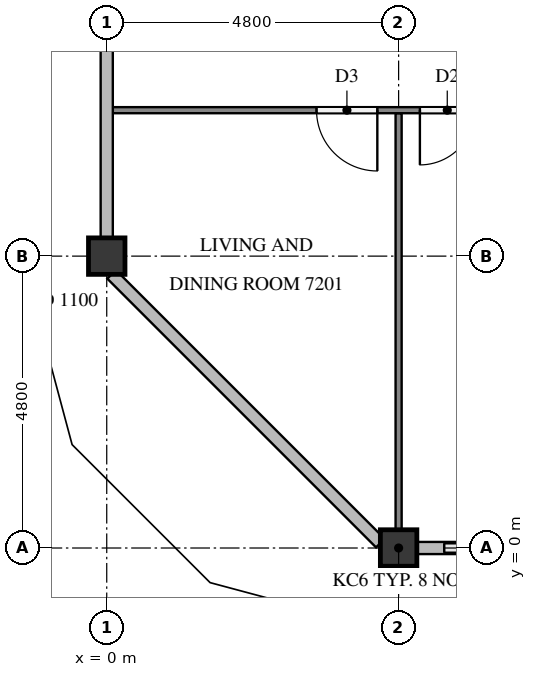
"""IFC4 building model, lengths in metres.
Left out: names, types, materials, properties, quantities, classifications, styles, units other than length and angle.
Written with IfcOpenShell. Run it as: python <this file> out.ifc"""

import sys

from ifc_helpers import new_model, si_unit, direction, frame, frame_2d, origin, origin_2d, place, context, subcontext, project, spatial, rectangle, extrude, element, fill, save


model = new_model("IFC4")
c1 = context("Model", 3, precision=1e-05, world=origin(), true_north=direction((0.0, 1.0)))
c2 = subcontext(c1, "Body", "Model", "MODEL_VIEW")
j1 = project(units=[si_unit("LENGTHUNIT", "METRE"), si_unit("PLANEANGLEUNIT", "RADIAN")], contexts=[c1])
p1 = place(None, origin())
s1 = spatial("IfcSite", under=j1, at=p1, CompositionType="ELEMENT")
p2 = place(p1, origin())
s2 = spatial("IfcBuilding", under=s1, at=p2, CompositionType="ELEMENT")
p3 = place(p2, frame((0.0, 0.0, 275.6)))
s3 = spatial("IfcBuildingStorey", under=s2, at=p3, CompositionType="ELEMENT", Elevation=275.6)
for number, where, z_axis, x_axis in (
    (1, (4.8, 0.0, 0.0), (0.0, 0.0, 1.0), (1.0, 0.0, 0.0)),
    (2, (0.0, 4.8, 0.0), (0.0, 0.0, 1.0), (1.0, 0.0, 0.0)),
):
    element("IfcColumn", number, at=place(p3, frame(where, z_axis=z_axis, x_axis=x_axis)), inside=s3, PredefinedType="COLUMN", context=c2, shape_type="SweptSolid", body=[
        extrude(rectangle(XDim=0.6, YDim=0.6, at=origin_2d()), origin(), (0.0, 0.0, 1.0), 3.2),
    ])
p4 = place(p3, frame((5.1, 0.0, 0.0), z_axis=(0.0, 0.0, 1.0), x_axis=(1.0, 0.0, 0.0)))
e3 = element("IfcWall", 3, at=p4, inside=s3, PredefinedType="SOLIDWALL", context=c2, shape_type="SweptSolid", body=[
    extrude(rectangle(XDim=2.1, YDim=0.15, at=frame_2d((1.05, 0.0))), origin(), (0.0, 0.0, 1.0), 3.2),
])
p5 = place(p4, frame((0.45, 0.0, 0.9)))
e4 = element("IfcOpeningElement", 4, at=p5, cuts=e3, PredefinedType="OPENING", context=c2, shape_type="SweptSolid", body=[
    extrude(rectangle(XDim=1.2, YDim=1.4, at=frame_2d((0.6, 0.7))), frame((0.0, 0.085, 0.0), z_axis=(0.0, -1.0, 0.0), x_axis=(1.0, 0.0, 0.0)), (0.0, 0.0, 1.0), 0.17),
])
p6 = place(p3, frame((4.8, 7.15, 0.0), z_axis=(0.0, 0.0, 1.0), x_axis=(0.0, -1.0, 0.0)))
e5 = element("IfcWall", 5, at=p6, inside=s3, PredefinedType="PARTITIONING", context=c2, shape_type="SweptSolid", body=[
    extrude(rectangle(XDim=6.85, YDim=0.1, at=frame_2d((3.425, 0.0))), origin(), (0.0, 0.0, 1.0), 3.2),
])
p7 = place(p3, frame((19.1, 7.2, 0.0), z_axis=(0.0, 0.0, 1.0), x_axis=(-1.0, 0.0, 0.0)))
e6 = element("IfcWall", 6, at=p7, inside=s3, PredefinedType="PARTITIONING", context=c2, shape_type="SweptSolid", body=[
    extrude(rectangle(XDim=19.0, YDim=0.1, at=frame_2d((9.5, 0.0))), origin(), (0.0, 0.0, 1.0), 3.2),
])
p8 = place(p7, frame((3.45, 0.0, 0.0)))
e7 = element("IfcOpeningElement", 7, at=p8, cuts=e6, PredefinedType="OPENING", context=c2, shape_type="SweptSolid", body=[
    extrude(rectangle(XDim=0.9, YDim=2.1, at=frame_2d((0.45, 1.05))), frame((0.0, 0.06, 0.0), z_axis=(0.0, -1.0, 0.0), x_axis=(1.0, 0.0, 0.0)), (0.0, 0.0, 1.0), 0.12),
])
p9 = place(p7, frame((5.05, 0.0, 0.0)))
e8 = element("IfcOpeningElement", 8, at=p9, cuts=e6, PredefinedType="OPENING", context=c2, shape_type="SweptSolid", body=[
    extrude(rectangle(XDim=0.9, YDim=2.1, at=frame_2d((0.45, 1.05))), frame((0.0, 0.06, 0.0), z_axis=(0.0, -1.0, 0.0), x_axis=(1.0, 0.0, 0.0)), (0.0, 0.0, 1.0), 0.12),
])
p10 = place(p7, frame((13.05, 0.0, 0.0)))
e9 = element("IfcOpeningElement", 9, at=p10, cuts=e6, PredefinedType="OPENING", context=c2, shape_type="SweptSolid", body=[
    extrude(rectangle(XDim=0.9, YDim=2.1, at=frame_2d((0.45, 1.05))), frame((0.0, 0.06, 0.0), z_axis=(0.0, -1.0, 0.0), x_axis=(1.0, 0.0, 0.0)), (0.0, 0.0, 1.0), 0.12),
])
p11 = place(p7, frame((14.65, 0.0, 0.0)))
e10 = element("IfcOpeningElement", 10, at=p11, cuts=e6, PredefinedType="OPENING", context=c2, shape_type="SweptSolid", body=[
    extrude(rectangle(XDim=1.0, YDim=2.1, at=frame_2d((0.5, 1.05))), frame((0.0, 0.06, 0.0), z_axis=(0.0, -1.0, 0.0), x_axis=(1.0, 0.0, 0.0)), (0.0, 0.0, 1.0), 0.12),
])
p12 = place(p5, origin())
e11 = element("IfcWindow", 11, at=p12, inside=s3, PartitioningType="SINGLE_PANEL", PredefinedType="WINDOW", context=c2, shape_type="SweptSolid", body=[
    extrude(rectangle(XDim=1.2, YDim=1.4, at=frame_2d((0.6, 0.7))), frame((0.0, 0.03, 0.0), z_axis=(0.0, -1.0, 0.0), x_axis=(1.0, 0.0, 0.0)), (0.0, 0.0, 1.0), 0.06),
])
fill(e4, e11)
p13 = place(p10, origin())
e12 = element("IfcDoor", 12, at=p13, inside=s3, OperationType="SINGLE_SWING_RIGHT", PredefinedType="DOOR", context=c2, shape_type="SweptSolid", body=[
    extrude(rectangle(XDim=0.9, YDim=2.1, at=frame_2d((0.45, 1.05))), frame((0.0, 0.025, 0.0), z_axis=(0.0, -1.0, 0.0), x_axis=(1.0, 0.0, 0.0)), (0.0, 0.0, 1.0), 0.05),
])
fill(e9, e12)
p14 = place(p11, origin())
e13 = element("IfcDoor", 13, at=p14, inside=s3, OperationType="SINGLE_SWING_LEFT", PredefinedType="DOOR", context=c2, shape_type="SweptSolid", body=[
    extrude(rectangle(XDim=1.0, YDim=2.1, at=frame_2d((0.5, 1.05))), frame((0.0, 0.025, 0.0), z_axis=(0.0, -1.0, 0.0), x_axis=(1.0, 0.0, 0.0)), (0.0, 0.0, 1.0), 0.05),
])
fill(e10, e13)
save(model, sys.argv[1])
